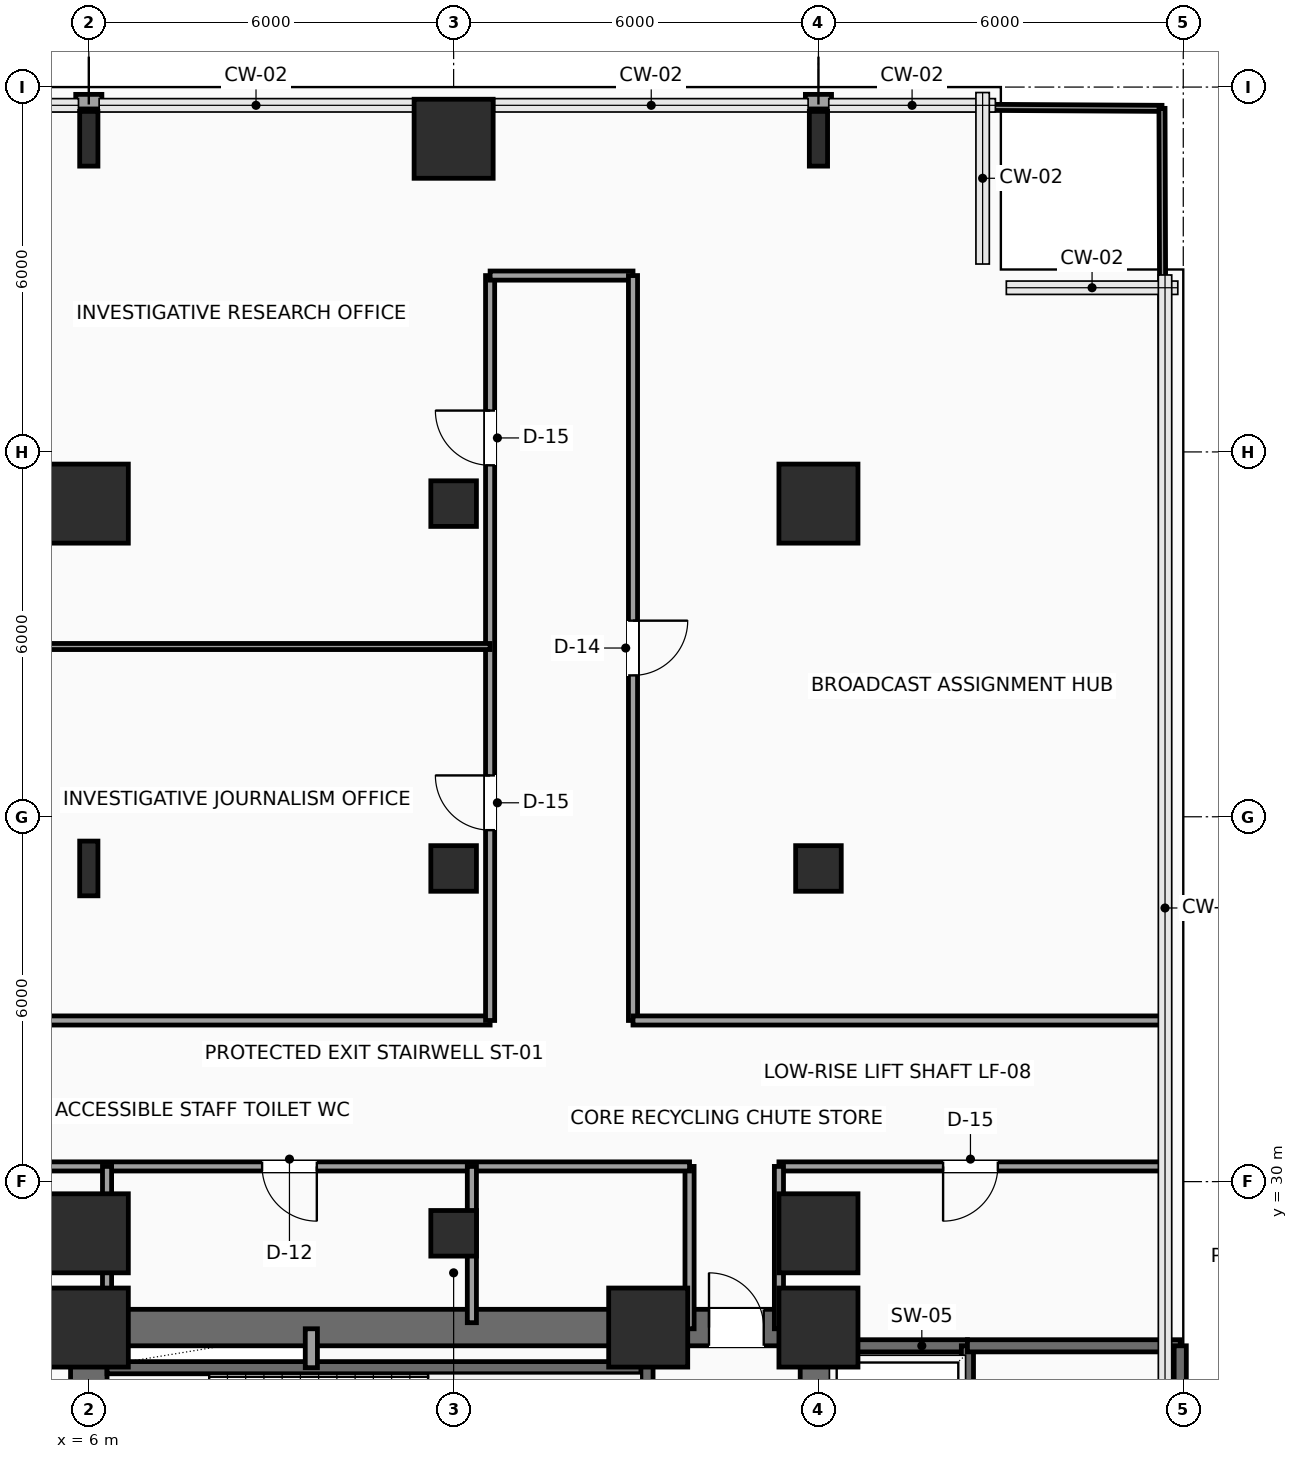
"""IFC4 building model, lengths in metres.
Left out: names, types, materials, properties, quantities, classifications, styles, units other than length and angle.
Written with IfcOpenShell. Run it as: python <this file> out.ifc"""

import sys

from ifc_helpers import new_model, si_unit, direction, frame, frame_2d, origin, origin_2d, place, context, subcontext, project, spatial, rectangle, hollow_rectangle, i_section, extrude, element, fill, save


model = new_model("IFC4")
c1 = context("Model", 3, precision=1e-05, world=origin(), true_north=direction((0.0, 1.0)))
c2 = subcontext(c1, "Body", "Model", "MODEL_VIEW")
j1 = project(units=[si_unit("LENGTHUNIT", "METRE"), si_unit("PLANEANGLEUNIT", "RADIAN")], contexts=[c1])
p1 = place(None, origin())
s1 = spatial("IfcSite", under=j1, at=p1, CompositionType="ELEMENT")
p2 = place(p1, origin())
s2 = spatial("IfcBuilding", under=s1, at=p2, CompositionType="ELEMENT")
p3 = place(p2, frame((0.0, 0.0, 32.4)))
s3 = spatial("IfcBuildingStorey", under=s2, at=p3, CompositionType="ELEMENT", Elevation=32.4)
for number, where, z_axis, x_axis in (
    (1, (6.0, 27.6, 0.0), (0.0, 0.0, 1.0), (1.0, 0.0, 0.0)),
    (2, (15.2, 27.6, 0.0), (0.0, 0.0, 1.0), (1.0, 0.0, 0.0)),
    (3, (18.0, 27.6, 0.0), (0.0, 0.0, 1.0), (1.0, 0.0, 0.0)),
    (4, (6.0, 29.15, 0.0), (0.0, 0.0, 1.0), (1.0, 0.0, 0.0)),
):
    element("IfcColumn", number, at=place(p3, frame(where, z_axis=z_axis, x_axis=x_axis)), inside=s3, PredefinedType="COLUMN", context=c2, shape_type="SweptSolid", body=[
        extrude(rectangle(XDim=1.3, YDim=1.3, at=origin_2d()), origin(), (0.0, 0.0, 1.0), 3.9),
    ])
p4 = place(p3, frame((6.0, 35.15, 0.0), z_axis=(0.0, 0.0, 1.0), x_axis=(1.0, 0.0, 0.0)))
e5 = element("IfcColumn", 5, at=p4, inside=s3, PredefinedType="COLUMN", context=c2, shape_type="SweptSolid", body=[
    extrude(i_section(OverallWidth=0.3, OverallDepth=0.9, WebThickness=0.019, FlangeThickness=0.035, FilletRadius=0.03, at=origin_2d()), origin(), (0.0, 0.0, 1.0), 3.9),
])
p5 = place(p3, frame((6.0, 41.15, 0.0), z_axis=(0.0, 0.0, 1.0), x_axis=(1.0, 0.0, 0.0)))
e6 = element("IfcColumn", 6, at=p5, inside=s3, PredefinedType="COLUMN", context=c2, shape_type="SweptSolid", body=[
    extrude(rectangle(XDim=1.3, YDim=1.3, at=origin_2d()), origin(), (0.0, 0.0, 1.0), 3.9),
])
p6 = place(p3, frame((6.0, 47.15, 0.0), z_axis=(0.0, 0.0, 1.0), x_axis=(1.0, 0.0, 0.0)))
e7 = element("IfcColumn", 7, at=p6, inside=s3, PredefinedType="COLUMN", context=c2, shape_type="SweptSolid", body=[
    extrude(i_section(OverallWidth=0.3, OverallDepth=0.9, WebThickness=0.019, FlangeThickness=0.035, FilletRadius=0.03, at=origin_2d()), origin(), (0.0, 0.0, 1.0), 3.9),
])
for number, where, z_axis, x_axis in (
    (8, (12.0, 29.15, 0.0), (0.0, 0.0, 1.0), (1.0, 0.0, 0.0)),
    (9, (12.0, 35.15, 0.0), (0.0, 0.0, 1.0), (1.0, 0.0, 0.0)),
    (10, (12.0, 41.15, 0.0), (0.0, 0.0, 1.0), (1.0, 0.0, 0.0)),
):
    element("IfcColumn", number, at=place(p3, frame(where, z_axis=z_axis, x_axis=x_axis)), inside=s3, PredefinedType="COLUMN", context=c2, shape_type="SweptSolid", body=[
        extrude(hollow_rectangle(XDim=0.75, YDim=0.75, WallThickness=0.035, InnerFilletRadius=0.035, OuterFilletRadius=0.05, at=origin_2d()), origin(), (0.0, 0.0, 1.0), 3.9),
    ])
for number, where, z_axis, x_axis in (
    (11, (12.0, 47.15, 0.0), (0.0, 0.0, 1.0), (1.0, 0.0, 0.0)),
    (12, (18.0, 29.15, 0.0), (0.0, 0.0, 1.0), (1.0, 0.0, 0.0)),
):
    element("IfcColumn", number, at=place(p3, frame(where, z_axis=z_axis, x_axis=x_axis)), inside=s3, PredefinedType="COLUMN", context=c2, shape_type="SweptSolid", body=[
        extrude(rectangle(XDim=1.3, YDim=1.3, at=origin_2d()), origin(), (0.0, 0.0, 1.0), 3.9),
    ])
p7 = place(p3, frame((18.0, 35.15, 0.0), z_axis=(0.0, 0.0, 1.0), x_axis=(1.0, 0.0, 0.0)))
e13 = element("IfcColumn", 13, at=p7, inside=s3, PredefinedType="COLUMN", context=c2, shape_type="SweptSolid", body=[
    extrude(hollow_rectangle(XDim=0.75, YDim=0.75, WallThickness=0.035, InnerFilletRadius=0.035, OuterFilletRadius=0.05, at=origin_2d()), origin(), (0.0, 0.0, 1.0), 3.9),
])
p8 = place(p3, frame((18.0, 41.15, 0.0), z_axis=(0.0, 0.0, 1.0), x_axis=(1.0, 0.0, 0.0)))
e14 = element("IfcColumn", 14, at=p8, inside=s3, PredefinedType="COLUMN", context=c2, shape_type="SweptSolid", body=[
    extrude(rectangle(XDim=1.3, YDim=1.3, at=origin_2d()), origin(), (0.0, 0.0, 1.0), 3.9),
])
p9 = place(p3, frame((18.0, 47.15, 0.0), z_axis=(0.0, 0.0, 1.0), x_axis=(1.0, 0.0, 0.0)))
e15 = element("IfcColumn", 15, at=p9, inside=s3, PredefinedType="COLUMN", context=c2, shape_type="SweptSolid", body=[
    extrude(i_section(OverallWidth=0.3, OverallDepth=0.9, WebThickness=0.019, FlangeThickness=0.035, FilletRadius=0.03, at=origin_2d()), origin(), (0.0, 0.0, 1.0), 3.9),
])
for number, where, z_axis, x_axis in (
    (16, (5.785, 47.76, 0.0), (0.0, 0.0, 1.0), (1.0, 0.0, 0.0)),
    (17, (17.785, 47.76, 0.0), (0.0, 0.0, 1.0), (1.0, 0.0, 0.0)),
):
    element("IfcWall", number, at=place(p3, frame(where, z_axis=z_axis, x_axis=x_axis)), inside=s3, PredefinedType="SOLIDWALL", context=c2, shape_type="SweptSolid", body=[
        extrude(rectangle(XDim=0.43, YDim=0.24, at=frame_2d((0.215, 0.0))), origin(), (0.0, 0.0, 1.0), 3.65),
    ])
p10 = place(p3, frame((6.0, 27.6, 0.0), z_axis=(0.0, 0.0, 1.0), x_axis=(1.0, 0.0, 0.0)))
e18 = element("IfcWall", 18, at=p10, inside=s3, PredefinedType="SHEAR", context=c2, shape_type="SweptSolid", body=[
    extrude(rectangle(XDim=12.0, YDim=0.6, at=frame_2d((6.0, 0.0))), origin(), (0.0, 0.0, 1.0), 3.65),
])
p11 = place(p10, frame((10.2, 0.0, 0.0)))
e19 = element("IfcOpeningElement", 19, at=p11, cuts=e18, PredefinedType="OPENING", context=c2, shape_type="SweptSolid", body=[
    extrude(rectangle(XDim=0.9, YDim=2.15, at=frame_2d((0.45, 1.075))), frame((0.0, 0.31, 0.0), z_axis=(0.0, -1.0, 0.0), x_axis=(1.0, 0.0, 0.0)), (0.0, 0.0, 1.0), 0.62),
])
for number, where, z_axis, x_axis in (
    (20, (6.0, 18.0, 0.0), (0.0, 0.0, 1.0), (0.0, 1.0, 0.0)),
    (21, (18.0, 18.0, 0.0), (0.0, 0.0, 1.0), (0.0, 1.0, 0.0)),
):
    element("IfcWall", number, at=place(p3, frame(where, z_axis=z_axis, x_axis=x_axis)), inside=s3, PredefinedType="SHEAR", context=c2, shape_type="SweptSolid", body=[
        extrude(rectangle(XDim=9.6, YDim=0.6, at=frame_2d((4.8, 0.0))), origin(), (0.0, 0.0, 1.0), 3.65),
    ])
p12 = place(p3, frame((6.3, 26.94, 0.0), z_axis=(0.0, 0.0, 1.0), x_axis=(1.0, 0.0, 0.0)))
e22 = element("IfcWall", 22, at=p12, inside=s3, PredefinedType="SHEAR", context=c2, shape_type="SweptSolid", body=[
    extrude(rectangle(XDim=8.88, YDim=0.2, at=frame_2d((4.44, 0.0))), origin(), (0.0, 0.0, 1.0), 3.65),
])
p13 = place(p3, frame((15.18, 23.26, 0.0), z_axis=(0.0, 0.0, 1.0), x_axis=(0.0, 1.0, 0.0)))
e23 = element("IfcWall", 23, at=p13, inside=s3, PredefinedType="SHEAR", context=c2, shape_type="SweptSolid", body=[
    extrude(rectangle(XDim=4.04, YDim=0.2, at=frame_2d((2.02, 0.0))), origin(), (0.0, 0.0, 1.0), 3.65),
])
p14 = place(p3, frame((9.66, 26.94, 0.0), z_axis=(0.0, 0.0, 1.0), x_axis=(0.0, 1.0, 0.0)))
e24 = element("IfcWall", 24, at=p14, inside=s3, PredefinedType="SOLIDWALL", context=c2, shape_type="SweptSolid", body=[
    extrude(rectangle(XDim=0.64, YDim=0.2, at=frame_2d((0.32, 0.0))), origin(), (0.0, 0.0, 1.0), 3.65),
])
p15 = place(p3, frame((18.1, 27.3, 0.0), z_axis=(0.0, 0.0, 1.0), x_axis=(1.0, 0.0, 0.0)))
e25 = element("IfcWall", 25, at=p15, inside=s3, PredefinedType="SHEAR", context=c2, shape_type="SweptSolid", body=[
    extrude(rectangle(XDim=2.35, YDim=0.2, at=frame_2d((1.175, 0.0))), origin(), (0.0, 0.0, 1.0), 3.65),
])
p16 = place(p3, frame((20.45, 18.25, 0.0), z_axis=(0.0, 0.0, 1.0), x_axis=(0.0, 1.0, 0.0)))
e26 = element("IfcWall", 26, at=p16, inside=s3, PredefinedType="SHEAR", context=c2, shape_type="SweptSolid", body=[
    extrude(rectangle(XDim=9.05, YDim=0.2, at=frame_2d((4.525, 0.0))), origin(), (0.0, 0.0, 1.0), 3.65),
])
p17 = place(p16, frame((0.4, 0.0, 0.0)))
e27 = element("IfcOpeningElement", 27, at=p17, cuts=e26, PredefinedType="OPENING", context=c2, shape_type="SweptSolid", body=[
    extrude(rectangle(XDim=1.2, YDim=2.2, at=frame_2d((0.6, 1.1))), frame((0.0, 0.11, 0.0), z_axis=(0.0, -1.0, 0.0), x_axis=(1.0, 0.0, 0.0)), (0.0, 0.0, 1.0), 0.22),
])
p18 = place(p16, frame((2.65, 0.0, 0.0)))
e28 = element("IfcOpeningElement", 28, at=p18, cuts=e26, PredefinedType="OPENING", context=c2, shape_type="SweptSolid", body=[
    extrude(rectangle(XDim=1.2, YDim=2.2, at=frame_2d((0.6, 1.1))), frame((0.0, 0.11, 0.0), z_axis=(0.0, -1.0, 0.0), x_axis=(1.0, 0.0, 0.0)), (0.0, 0.0, 1.0), 0.22),
])
p19 = place(p16, frame((4.9, 0.0, 0.0)))
e29 = element("IfcOpeningElement", 29, at=p19, cuts=e26, PredefinedType="OPENING", context=c2, shape_type="SweptSolid", body=[
    extrude(rectangle(XDim=1.2, YDim=2.2, at=frame_2d((0.6, 1.1))), frame((0.0, 0.11, 0.0), z_axis=(0.0, -1.0, 0.0), x_axis=(1.0, 0.0, 0.0)), (0.0, 0.0, 1.0), 0.22),
])
p20 = place(p16, frame((7.15, 0.0, 0.0)))
e30 = element("IfcOpeningElement", 30, at=p20, cuts=e26, PredefinedType="OPENING", context=c2, shape_type="SweptSolid", body=[
    extrude(rectangle(XDim=1.2, YDim=2.2, at=frame_2d((0.6, 1.1))), frame((0.0, 0.11, 0.0), z_axis=(0.0, -1.0, 0.0), x_axis=(1.0, 0.0, 0.0)), (0.0, 0.0, 1.0), 0.22),
])
p21 = place(p3, frame((20.45, 27.3, 0.0), z_axis=(0.0, 0.0, 1.0), x_axis=(1.0, 0.0, 0.0)))
e31 = element("IfcWall", 31, at=p21, inside=s3, PredefinedType="SHEAR", context=c2, shape_type="SweptSolid", body=[
    extrude(rectangle(XDim=3.5, YDim=0.2, at=frame_2d((1.75, 0.0))), origin(), (0.0, 0.0, 1.0), 3.65),
])
p22 = place(p3, frame((23.95, 18.0, 0.0), z_axis=(0.0, 0.0, 1.0), x_axis=(0.0, 1.0, 0.0)))
e32 = element("IfcWall", 32, at=p22, inside=s3, PredefinedType="SHEAR", context=c2, shape_type="SweptSolid", body=[
    extrude(rectangle(XDim=9.3, YDim=0.2, at=frame_2d((4.65, 0.0))), origin(), (0.0, 0.0, 1.0), 3.65),
])
p23 = place(p3, frame((5.25, 32.65, 0.0), z_axis=(0.0, 0.0, 1.0), x_axis=(1.0, 0.0, 0.0)))
e33 = element("IfcWall", 33, at=p23, inside=s3, PredefinedType="PARTITIONING", context=c2, shape_type="SweptSolid", body=[
    extrude(rectangle(XDim=7.35, YDim=0.15, at=frame_2d((3.675, 0.0))), origin(), (0.0, 0.0, 1.0), 3.65),
])
p24 = place(p3, frame((12.6, 32.65, 0.0), z_axis=(0.0, 0.0, 1.0), x_axis=(0.0, 1.0, 0.0)))
e34 = element("IfcWall", 34, at=p24, inside=s3, PredefinedType="PARTITIONING", context=c2, shape_type="SweptSolid", body=[
    extrude(rectangle(XDim=12.25, YDim=0.15, at=frame_2d((6.125, 0.0))), origin(), (0.0, 0.0, 1.0), 3.65),
])
p25 = place(p24, frame((3.13, 0.0, 0.0)))
e35 = element("IfcOpeningElement", 35, at=p25, cuts=e34, PredefinedType="OPENING", context=c2, shape_type="SweptSolid", body=[
    extrude(rectangle(XDim=0.9, YDim=2.1, at=frame_2d((0.45, 1.05))), frame((0.0, 0.085, 0.0), z_axis=(0.0, -1.0, 0.0), x_axis=(1.0, 0.0, 0.0)), (0.0, 0.0, 1.0), 0.17),
])
p26 = place(p24, frame((9.13, 0.0, 0.0)))
e36 = element("IfcOpeningElement", 36, at=p26, cuts=e34, PredefinedType="OPENING", context=c2, shape_type="SweptSolid", body=[
    extrude(rectangle(XDim=0.9, YDim=2.1, at=frame_2d((0.45, 1.05))), frame((0.0, 0.085, 0.0), z_axis=(0.0, -1.0, 0.0), x_axis=(1.0, 0.0, 0.0)), (0.0, 0.0, 1.0), 0.17),
])
p27 = place(p3, frame((12.6, 44.9, 0.0), z_axis=(0.0, 0.0, 1.0), x_axis=(1.0, 0.0, 0.0)))
e37 = element("IfcWall", 37, at=p27, inside=s3, PredefinedType="PARTITIONING", context=c2, shape_type="SweptSolid", body=[
    extrude(rectangle(XDim=2.35, YDim=0.15, at=frame_2d((1.175, 0.0))), origin(), (0.0, 0.0, 1.0), 3.65),
])
p28 = place(p3, frame((14.95, 44.9, 0.0), z_axis=(0.0, 0.0, 1.0), x_axis=(0.0, -1.0, 0.0)))
e38 = element("IfcWall", 38, at=p28, inside=s3, PredefinedType="PARTITIONING", context=c2, shape_type="SweptSolid", body=[
    extrude(rectangle(XDim=12.25, YDim=0.15, at=frame_2d((6.125, 0.0))), origin(), (0.0, 0.0, 1.0), 3.65),
])
p29 = place(p28, frame((5.675, 0.0, 0.0)))
e39 = element("IfcOpeningElement", 39, at=p29, cuts=e38, PredefinedType="OPENING", context=c2, shape_type="SweptSolid", body=[
    extrude(rectangle(XDim=0.9, YDim=2.1, at=frame_2d((0.45, 1.05))), frame((0.0, 0.085, 0.0), z_axis=(0.0, -1.0, 0.0), x_axis=(1.0, 0.0, 0.0)), (0.0, 0.0, 1.0), 0.17),
])
p30 = place(p3, frame((14.95, 32.65, 0.0), z_axis=(0.0, 0.0, 1.0), x_axis=(1.0, 0.0, 0.0)))
e40 = element("IfcWall", 40, at=p30, inside=s3, PredefinedType="PARTITIONING", context=c2, shape_type="SweptSolid", body=[
    extrude(rectangle(XDim=8.75, YDim=0.15, at=frame_2d((4.375, 0.0))), origin(), (0.0, 0.0, 1.0), 3.65),
])
p31 = place(p3, frame((23.7, 30.25, 0.0), z_axis=(0.0, 0.0, 1.0), x_axis=(-1.0, 0.0, 0.0)))
e41 = element("IfcWall", 41, at=p31, inside=s3, PredefinedType="PARTITIONING", context=c2, shape_type="SweptSolid", body=[
    extrude(rectangle(XDim=6.35, YDim=0.15, at=frame_2d((3.175, 0.0))), origin(), (0.0, 0.0, 1.0), 3.65),
])
p32 = place(p31, frame((2.75, 0.0, 0.0)))
e42 = element("IfcOpeningElement", 42, at=p32, cuts=e41, PredefinedType="OPENING", context=c2, shape_type="SweptSolid", body=[
    extrude(rectangle(XDim=0.9, YDim=2.1, at=frame_2d((0.45, 1.05))), frame((0.0, 0.085, 0.0), z_axis=(0.0, -1.0, 0.0), x_axis=(1.0, 0.0, 0.0)), (0.0, 0.0, 1.0), 0.17),
])
for number, where, z_axis, x_axis in (
    (43, (17.35, 30.25, 0.0), (0.0, 0.0, 1.0), (0.0, -1.0, 0.0)),
    (44, (15.88, 27.58, 0.0), (0.0, 0.0, 1.0), (0.0, 1.0, 0.0)),
):
    element("IfcWall", number, at=place(p3, frame(where, z_axis=z_axis, x_axis=x_axis)), inside=s3, PredefinedType="PARTITIONING", context=c2, shape_type="SweptSolid", body=[
        extrude(rectangle(XDim=2.67, YDim=0.15, at=frame_2d((1.335, 0.0))), origin(), (0.0, 0.0, 1.0), 3.65),
    ])
p33 = place(p3, frame((15.88, 30.25, 0.0), z_axis=(0.0, 0.0, 1.0), x_axis=(-1.0, 0.0, 0.0)))
e45 = element("IfcWall", 45, at=p33, inside=s3, PredefinedType="PARTITIONING", context=c2, shape_type="SweptSolid", body=[
    extrude(rectangle(XDim=10.63, YDim=0.15, at=frame_2d((5.315, 0.0))), origin(), (0.0, 0.0, 1.0), 3.65),
])
p34 = place(p33, frame((6.13, 0.0, 0.0)))
e46 = element("IfcOpeningElement", 46, at=p34, cuts=e45, PredefinedType="OPENING", context=c2, shape_type="SweptSolid", body=[
    extrude(rectangle(XDim=0.9, YDim=2.1, at=frame_2d((0.45, 1.05))), frame((0.0, 0.085, 0.0), z_axis=(0.0, -1.0, 0.0), x_axis=(1.0, 0.0, 0.0)), (0.0, 0.0, 1.0), 0.17),
])
for number, where, z_axis, x_axis in (
    (47, (6.3, 27.68, 0.0), (0.0, 0.0, 1.0), (0.0, 1.0, 0.0)),
    (48, (12.3, 27.68, 0.0), (0.0, 0.0, 1.0), (0.0, 1.0, 0.0)),
):
    element("IfcWall", number, at=place(p3, frame(where, z_axis=z_axis, x_axis=x_axis)), inside=s3, PredefinedType="PARTITIONING", context=c2, shape_type="SweptSolid", body=[
        extrude(rectangle(XDim=2.57, YDim=0.15, at=frame_2d((1.285, 0.0))), origin(), (0.0, 0.0, 1.0), 2.992),
    ])
p35 = place(p3, frame((0.3, 38.8, 0.0), z_axis=(0.0, 0.0, 1.0), x_axis=(1.0, 0.0, 0.0)))
e49 = element("IfcWall", 49, at=p35, inside=s3, PredefinedType="PARTITIONING", context=c2, shape_type="SweptSolid", body=[
    extrude(rectangle(XDim=12.3, YDim=0.1, at=frame_2d((6.15, 0.0))), origin(), (0.0, 0.0, 1.0), 3.65),
])
p36 = place(p3, frame((0.35, 47.65, 0.0), z_axis=(0.0, 0.0, 1.0), x_axis=(0.999991644778, 0.004087832518, 0.0)))
e50 = element("IfcWall", 50, at=p36, inside=s3, PredefinedType="PARTITIONING", context=c2, shape_type="SweptSolid", body=[
    extrude(rectangle(XDim=5.435, YDim=0.1, at=frame_2d((2.717, 0.0))), origin(), (0.0, 0.0, 1.0), 3.65),
])
p37 = place(p3, frame((6.215, 47.674, 0.0), z_axis=(0.0, 0.0, 1.0), x_axis=(0.999991630701, 0.004091274595, 0.0)))
e51 = element("IfcWall", 51, at=p37, inside=s3, PredefinedType="PARTITIONING", context=c2, shape_type="SweptSolid", body=[
    extrude(rectangle(XDim=6.385, YDim=0.1, at=frame_2d((3.192, 0.0))), origin(), (0.0, 0.0, 1.0), 3.65),
])
p38 = place(p3, frame((14.95, 47.7, 0.0), z_axis=(0.0, 0.0, 1.0), x_axis=(0.999983354582, -0.005769797172, 0.0)))
e52 = element("IfcWall", 52, at=p38, inside=s3, PredefinedType="PARTITIONING", context=c2, shape_type="SweptSolid", body=[
    extrude(rectangle(XDim=2.835, YDim=0.1, at=frame_2d((1.417, 0.0))), origin(), (0.0, 0.0, 1.0), 3.65),
])
p39 = place(p3, frame((18.215, 47.681, 0.0), z_axis=(0.0, 0.0, 1.0), x_axis=(0.999983469354, -0.005749871258, 0.0)))
e53 = element("IfcWall", 53, at=p39, inside=s3, PredefinedType="PARTITIONING", context=c2, shape_type="SweptSolid", body=[
    extrude(rectangle(XDim=5.435, YDim=0.1, at=frame_2d((2.717, 0.0))), origin(), (0.0, 0.0, 1.0), 3.65),
])
p40 = place(p3, frame((23.7, 32.65, 0.0), z_axis=(0.0, 0.0, 1.0), x_axis=(-0.003336569969, 0.999994433635, 0.0)))
e54 = element("IfcWall", 54, at=p40, inside=s3, PredefinedType="PARTITIONING", context=c2, shape_type="SweptSolid", body=[
    extrude(rectangle(XDim=15.0, YDim=0.1, at=frame_2d((7.5, 0.0))), origin(), (0.0, 0.0, 1.0), 3.65),
])
p41 = place(p11, origin())
e55 = element("IfcDoor", 55, at=p41, inside=s3, OperationType="SINGLE_SWING_LEFT", PredefinedType="DOOR", context=c2, shape_type="SweptSolid", body=[
    extrude(rectangle(XDim=0.9, YDim=2.15, at=frame_2d((0.45, 1.075))), frame((0.0, 0.025, 0.0), z_axis=(0.0, -1.0, 0.0), x_axis=(1.0, 0.0, 0.0)), (0.0, 0.0, 1.0), 0.05),
])
fill(e19, e55)
p42 = place(p25, origin())
e56 = element("IfcDoor", 56, at=p42, inside=s3, OperationType="SINGLE_SWING_RIGHT", PredefinedType="DOOR", context=c2, shape_type="SweptSolid", body=[
    extrude(rectangle(XDim=0.9, YDim=2.1, at=frame_2d((0.45, 1.05))), frame((0.0, 0.025, 0.0), z_axis=(0.0, -1.0, 0.0), x_axis=(1.0, 0.0, 0.0)), (0.0, 0.0, 1.0), 0.05),
])
fill(e35, e56)
p43 = place(p26, origin())
e57 = element("IfcDoor", 57, at=p43, inside=s3, OperationType="SINGLE_SWING_RIGHT", PredefinedType="DOOR", context=c2, shape_type="SweptSolid", body=[
    extrude(rectangle(XDim=0.9, YDim=2.1, at=frame_2d((0.45, 1.05))), frame((0.0, 0.025, 0.0), z_axis=(0.0, -1.0, 0.0), x_axis=(1.0, 0.0, 0.0)), (0.0, 0.0, 1.0), 0.05),
])
fill(e36, e57)
p44 = place(p29, origin())
e58 = element("IfcDoor", 58, at=p44, inside=s3, OperationType="SINGLE_SWING_LEFT", PredefinedType="DOOR", context=c2, shape_type="SweptSolid", body=[
    extrude(rectangle(XDim=0.9, YDim=2.1, at=frame_2d((0.45, 1.05))), frame((0.0, 0.025, 0.0), z_axis=(0.0, -1.0, 0.0), x_axis=(1.0, 0.0, 0.0)), (0.0, 0.0, 1.0), 0.05),
])
fill(e39, e58)
p45 = place(p32, origin())
e59 = element("IfcDoor", 59, at=p45, inside=s3, OperationType="SINGLE_SWING_RIGHT", PredefinedType="DOOR", context=c2, shape_type="SweptSolid", body=[
    extrude(rectangle(XDim=0.9, YDim=2.1, at=frame_2d((0.45, 1.05))), frame((0.0, 0.025, 0.0), z_axis=(0.0, -1.0, 0.0), x_axis=(1.0, 0.0, 0.0)), (0.0, 0.0, 1.0), 0.05),
])
fill(e42, e59)
p46 = place(p34, origin())
e60 = element("IfcDoor", 60, at=p46, inside=s3, OperationType="SINGLE_SWING_LEFT", PredefinedType="DOOR", context=c2, shape_type="SweptSolid", body=[
    extrude(rectangle(XDim=0.9, YDim=2.1, at=frame_2d((0.45, 1.05))), frame((0.0, 0.025, 0.0), z_axis=(0.0, -1.0, 0.0), x_axis=(1.0, 0.0, 0.0)), (0.0, 0.0, 1.0), 0.05),
])
fill(e46, e60)
save(model, sys.argv[1])
